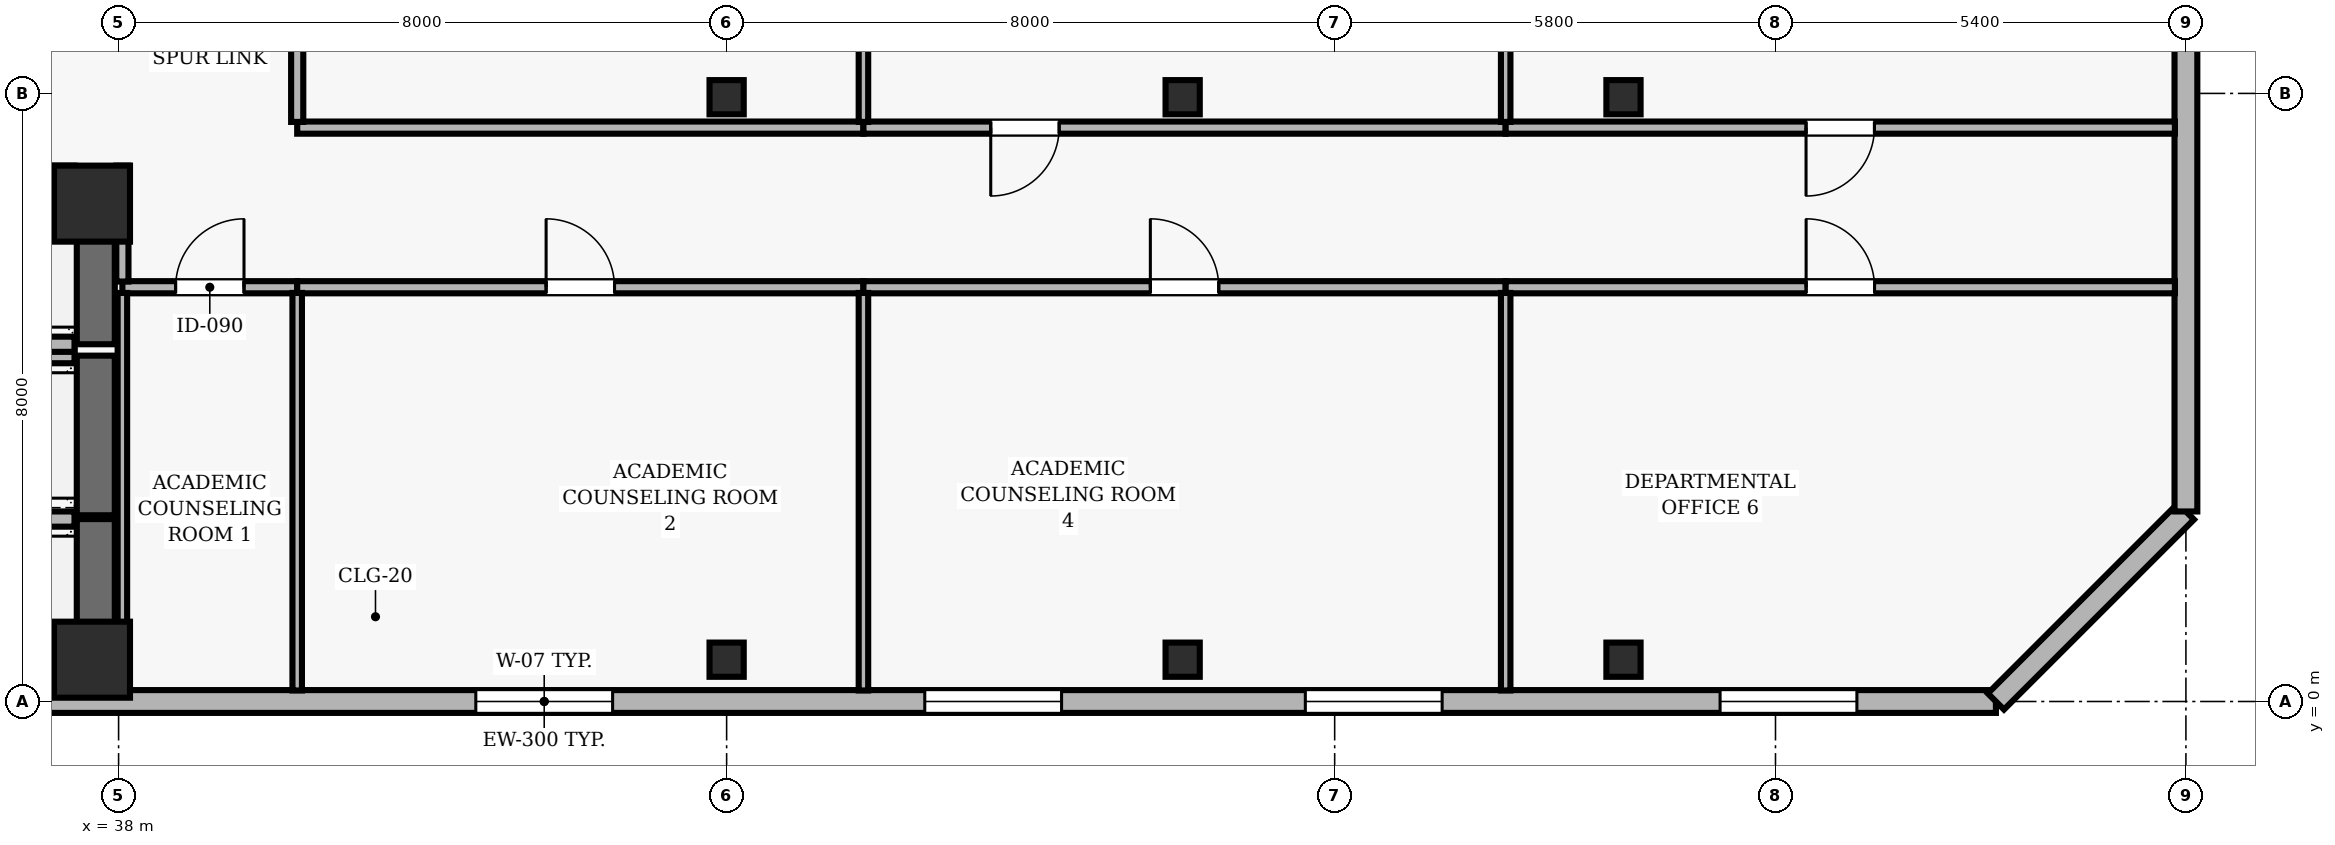
"""IFC4 building model, lengths in metres.
Left out: names, types, materials, properties, quantities, classifications, styles, units other than length and angle.
Written with IfcOpenShell. Run it as: python <this file> out.ifc"""

import sys

from ifc_helpers import new_model, si_unit, direction, frame, frame_2d, origin, origin_2d, place, context, subcontext, project, spatial, rectangle, hollow_rectangle, extrude, element, fill, save


model = new_model("IFC4")
c1 = context("Model", 3, precision=1e-05, world=origin(), true_north=direction((0.0, 1.0)))
c2 = subcontext(c1, "Body", "Model", "MODEL_VIEW")
j1 = project(units=[si_unit("LENGTHUNIT", "METRE"), si_unit("PLANEANGLEUNIT", "RADIAN")], contexts=[c1])
p1 = place(None, origin())
s1 = spatial("IfcSite", under=j1, at=p1, CompositionType="ELEMENT")
p2 = place(p1, origin())
s2 = spatial("IfcBuilding", under=s1, at=p2, CompositionType="ELEMENT")
p3 = place(p2, frame((0.0, 0.0, 222.6)))
s3 = spatial("IfcBuildingStorey", under=s2, at=p3, CompositionType="ELEMENT", Elevation=222.6)
for number, where, z_axis, x_axis in (
    (1, (37.65, 0.55, 0.0), (0.0, 0.0, 1.0), (1.0, 0.0, 0.0)),
    (2, (37.65, 6.55, 0.0), (0.0, 0.0, 1.0), (1.0, 0.0, 0.0)),
):
    element("IfcColumn", number, at=place(p3, frame(where, z_axis=z_axis, x_axis=x_axis)), inside=s3, PredefinedType="COLUMN", context=c2, shape_type="SweptSolid", body=[
        extrude(rectangle(XDim=1.0, YDim=1.0, at=origin_2d()), origin(), (0.0, 0.0, 1.0), 3.9),
    ])
for number, where, z_axis, x_axis in (
    (3, (46.0, 0.55, 0.0), (0.0, 0.0, 1.0), (1.0, 0.0, 0.0)),
    (4, (46.0, 7.95, 0.0), (0.0, 0.0, 1.0), (1.0, 0.0, 0.0)),
    (5, (52.0, 0.55, 0.0), (0.0, 0.0, 1.0), (1.0, 0.0, 0.0)),
    (6, (52.0, 7.95, 0.0), (0.0, 0.0, 1.0), (1.0, 0.0, 0.0)),
    (7, (57.8, 0.55, 0.0), (0.0, 0.0, 1.0), (1.0, 0.0, 0.0)),
    (8, (57.8, 7.95, 0.0), (0.0, 0.0, 1.0), (1.0, 0.0, 0.0)),
):
    element("IfcColumn", number, at=place(p3, frame(where, z_axis=z_axis, x_axis=x_axis)), inside=s3, PredefinedType="COLUMN", context=c2, shape_type="SweptSolid", body=[
        extrude(hollow_rectangle(XDim=0.45, YDim=0.45, WallThickness=0.02, at=origin_2d()), origin(), (0.0, 0.0, 1.0), 3.9),
    ])
p4 = place(p3, frame((24.5, 0.0, 0.0), z_axis=(0.0, 0.0, 1.0), x_axis=(1.0, 0.0, 0.0)))
e9 = element("IfcWall", 9, at=p4, inside=s3, PredefinedType="SOLIDWALL", context=c2, shape_type="SweptSolid", body=[
    extrude(rectangle(XDim=38.2, YDim=0.3, at=frame_2d((19.1, 0.0))), origin(), (0.0, 0.0, 1.0), 3.69),
])
p5 = place(p4, frame((1.829, 0.0, 0.9)))
e10 = element("IfcOpeningElement", 10, at=p5, cuts=e9, PredefinedType="OPENING", context=c2, shape_type="SweptSolid", body=[
    extrude(rectangle(XDim=1.8, YDim=1.8, at=frame_2d((0.9, 0.9))), frame((0.0, 0.16, 0.0), z_axis=(0.0, -1.0, 0.0), x_axis=(1.0, 0.0, 0.0)), (0.0, 0.0, 1.0), 0.32),
])
p6 = place(p4, frame((8.186, 0.0, 0.9)))
e11 = element("IfcOpeningElement", 11, at=p6, cuts=e9, PredefinedType="OPENING", context=c2, shape_type="SweptSolid", body=[
    extrude(rectangle(XDim=1.8, YDim=1.8, at=frame_2d((0.9, 0.9))), frame((0.0, 0.16, 0.0), z_axis=(0.0, -1.0, 0.0), x_axis=(1.0, 0.0, 0.0)), (0.0, 0.0, 1.0), 0.32),
])
p7 = place(p4, frame((18.2, 0.0, 0.9)))
e12 = element("IfcOpeningElement", 12, at=p7, cuts=e9, PredefinedType="OPENING", context=c2, shape_type="SweptSolid", body=[
    extrude(rectangle(XDim=1.8, YDim=1.8, at=frame_2d((0.9, 0.9))), frame((0.0, 0.16, 0.0), z_axis=(0.0, -1.0, 0.0), x_axis=(1.0, 0.0, 0.0)), (0.0, 0.0, 1.0), 0.32),
])
p8 = place(p4, frame((24.107, 0.0, 0.9)))
e13 = element("IfcOpeningElement", 13, at=p8, cuts=e9, PredefinedType="OPENING", context=c2, shape_type="SweptSolid", body=[
    extrude(rectangle(XDim=1.8, YDim=1.8, at=frame_2d((0.9, 0.9))), frame((0.0, 0.16, 0.0), z_axis=(0.0, -1.0, 0.0), x_axis=(1.0, 0.0, 0.0)), (0.0, 0.0, 1.0), 0.32),
])
p9 = place(p4, frame((29.114, 0.0, 0.9)))
e14 = element("IfcOpeningElement", 14, at=p9, cuts=e9, PredefinedType="OPENING", context=c2, shape_type="SweptSolid", body=[
    extrude(rectangle(XDim=1.8, YDim=1.8, at=frame_2d((0.9, 0.9))), frame((0.0, 0.16, 0.0), z_axis=(0.0, -1.0, 0.0), x_axis=(1.0, 0.0, 0.0)), (0.0, 0.0, 1.0), 0.32),
])
p10 = place(p4, frame((34.571, 0.0, 0.9)))
e15 = element("IfcOpeningElement", 15, at=p10, cuts=e9, PredefinedType="OPENING", context=c2, shape_type="SweptSolid", body=[
    extrude(rectangle(XDim=1.8, YDim=1.8, at=frame_2d((0.9, 0.9))), frame((0.0, 0.16, 0.0), z_axis=(0.0, -1.0, 0.0), x_axis=(1.0, 0.0, 0.0)), (0.0, 0.0, 1.0), 0.32),
])
p11 = place(p3, frame((62.7, 0.0, 0.0), z_axis=(0.0, 0.0, 1.0), x_axis=(0.707106781187, 0.707106781187, 0.0)))
e16 = element("IfcWall", 16, at=p11, inside=s3, PredefinedType="SOLIDWALL", context=c2, shape_type="SweptSolid", body=[
    extrude(rectangle(XDim=3.536, YDim=0.3, at=frame_2d((1.768, 0.0))), origin(), (0.0, 0.0, 1.0), 3.69),
])
p12 = place(p3, frame((65.2, 2.5, 0.0), z_axis=(0.0, 0.0, 1.0), x_axis=(0.0, 1.0, 0.0)))
e17 = element("IfcWall", 17, at=p12, inside=s3, PredefinedType="SOLIDWALL", context=c2, shape_type="SweptSolid", body=[
    extrude(rectangle(XDim=11.0, YDim=0.3, at=frame_2d((5.5, 0.0))), origin(), (0.0, 0.0, 1.0), 3.69),
])
p13 = place(p12, frame((6.85, 0.0, 0.9)))
e18 = element("IfcOpeningElement", 18, at=p13, cuts=e17, PredefinedType="OPENING", context=c2, shape_type="SweptSolid", body=[
    extrude(rectangle(XDim=2.8, YDim=1.8, at=frame_2d((1.4, 0.9))), frame((0.0, 0.16, 0.0), z_axis=(0.0, -1.0, 0.0), x_axis=(1.0, 0.0, 0.0)), (0.0, 0.0, 1.0), 0.32),
])
p14 = place(p3, frame((37.7, 0.3, 0.0), z_axis=(0.0, 0.0, 1.0), x_axis=(0.0, 1.0, 0.0)))
e19 = element("IfcWall", 19, at=p14, inside=s3, PredefinedType="SHEAR", context=c2, shape_type="SweptSolid", body=[
    extrude(rectangle(XDim=2.1, YDim=0.5, at=frame_2d((1.05, 0.0))), origin(), (0.0, 0.0, 1.0), 3.69),
])
for number, where, z_axis, x_axis in (
    (20, (35.28, 0.3, 0.0), (0.0, 0.0, 1.0), (1.0, 0.0, 0.0)),
    (21, (37.42, 2.4, 0.0), (0.0, 0.0, 1.0), (-1.0, 0.0, 0.0)),
):
    element("IfcWall", number, at=place(p3, frame(where, z_axis=z_axis, x_axis=x_axis)), inside=s3, PredefinedType="SOLIDWALL", context=c2, shape_type="SweptSolid", body=[
        extrude(rectangle(XDim=2.14, YDim=0.2, at=frame_2d((1.07, 0.0))), origin(), (0.0, 0.0, 1.0), 3.69),
    ])
p15 = place(p3, frame((37.7, 2.45, 0.0), z_axis=(0.0, 0.0, 1.0), x_axis=(0.0, 1.0, 0.0)))
e22 = element("IfcWall", 22, at=p15, inside=s3, PredefinedType="SHEAR", context=c2, shape_type="SweptSolid", body=[
    extrude(rectangle(XDim=2.1, YDim=0.5, at=frame_2d((1.05, 0.0))), origin(), (0.0, 0.0, 1.0), 3.69),
])
p16 = place(p3, frame((37.42, 4.55, 0.0), z_axis=(0.0, 0.0, 1.0), x_axis=(-1.0, 0.0, 0.0)))
e23 = element("IfcWall", 23, at=p16, inside=s3, PredefinedType="SOLIDWALL", context=c2, shape_type="SweptSolid", body=[
    extrude(rectangle(XDim=2.14, YDim=0.2, at=frame_2d((1.07, 0.0))), origin(), (0.0, 0.0, 1.0), 3.69),
])
p17 = place(p3, frame((37.7, 4.7, 0.0), z_axis=(0.0, 0.0, 1.0), x_axis=(0.0, 1.0, 0.0)))
e24 = element("IfcWall", 24, at=p17, inside=s3, PredefinedType="SHEAR", context=c2, shape_type="SweptSolid", body=[
    extrude(rectangle(XDim=2.25, YDim=0.5, at=frame_2d((1.125, 0.0))), origin(), (0.0, 0.0, 1.0), 3.69),
])
for number, where, z_axis, x_axis in (
    (25, (35.28, 4.7, 0.0), (0.0, 0.0, 1.0), (1.0, 0.0, 0.0)),
    (26, (37.42, 6.95, 0.0), (0.0, 0.0, 1.0), (-1.0, 0.0, 0.0)),
):
    element("IfcWall", number, at=place(p3, frame(where, z_axis=z_axis, x_axis=x_axis)), inside=s3, PredefinedType="SOLIDWALL", context=c2, shape_type="SweptSolid", body=[
        extrude(rectangle(XDim=2.14, YDim=0.2, at=frame_2d((1.07, 0.0))), origin(), (0.0, 0.0, 1.0), 3.69),
    ])
p18 = place(p3, frame((38.05, 5.45, 0.0), z_axis=(0.0, 0.0, 1.0), x_axis=(1.0, 0.0, 0.0)))
e27 = element("IfcWall", 27, at=p18, inside=s3, PredefinedType="PARTITIONING", context=c2, shape_type="SweptSolid", body=[
    extrude(rectangle(XDim=2.3, YDim=0.16, at=frame_2d((1.15, 0.0))), origin(), (0.0, 0.0, 1.0), 3.343),
])
p19 = place(p18, frame((0.7, 0.0, 0.0)))
e28 = element("IfcOpeningElement", 28, at=p19, cuts=e27, PredefinedType="OPENING", context=c2, shape_type="SweptSolid", body=[
    extrude(rectangle(XDim=0.9, YDim=2.1, at=frame_2d((0.45, 1.05))), frame((0.0, 0.09, 0.0), z_axis=(0.0, -1.0, 0.0), x_axis=(1.0, 0.0, 0.0)), (0.0, 0.0, 1.0), 0.18),
])
p20 = place(p3, frame((40.35, 5.45, 0.0), z_axis=(0.0, 0.0, 1.0), x_axis=(1.0, 0.0, 0.0)))
e29 = element("IfcWall", 29, at=p20, inside=s3, PredefinedType="PARTITIONING", context=c2, shape_type="SweptSolid", body=[
    extrude(rectangle(XDim=7.45, YDim=0.16, at=frame_2d((3.725, 0.0))), origin(), (0.0, 0.0, 1.0), 3.343),
])
p21 = place(p20, frame((3.275, 0.0, 0.0)))
e30 = element("IfcOpeningElement", 30, at=p21, cuts=e29, PredefinedType="OPENING", context=c2, shape_type="SweptSolid", body=[
    extrude(rectangle(XDim=0.9, YDim=2.1, at=frame_2d((0.45, 1.05))), frame((0.0, 0.09, 0.0), z_axis=(0.0, -1.0, 0.0), x_axis=(1.0, 0.0, 0.0)), (0.0, 0.0, 1.0), 0.18),
])
p22 = place(p3, frame((47.8, 5.45, 0.0), z_axis=(0.0, 0.0, 1.0), x_axis=(1.0, 0.0, 0.0)))
e31 = element("IfcWall", 31, at=p22, inside=s3, PredefinedType="PARTITIONING", context=c2, shape_type="SweptSolid", body=[
    extrude(rectangle(XDim=8.45, YDim=0.16, at=frame_2d((4.225, 0.0))), origin(), (0.0, 0.0, 1.0), 3.343),
])
p23 = place(p22, frame((3.775, 0.0, 0.0)))
e32 = element("IfcOpeningElement", 32, at=p23, cuts=e31, PredefinedType="OPENING", context=c2, shape_type="SweptSolid", body=[
    extrude(rectangle(XDim=0.9, YDim=2.1, at=frame_2d((0.45, 1.05))), frame((0.0, 0.09, 0.0), z_axis=(0.0, -1.0, 0.0), x_axis=(1.0, 0.0, 0.0)), (0.0, 0.0, 1.0), 0.18),
])
p24 = place(p3, frame((47.8, 7.55, 0.0), z_axis=(0.0, 0.0, 1.0), x_axis=(-1.0, 0.0, 0.0)))
e33 = element("IfcWall", 33, at=p24, inside=s3, PredefinedType="PARTITIONING", context=c2, shape_type="SweptSolid", body=[
    extrude(rectangle(XDim=7.45, YDim=0.16, at=frame_2d((3.725, 0.0))), origin(), (0.0, 0.0, 1.0), 3.139),
])
p25 = place(p3, frame((56.25, 5.45, 0.0), z_axis=(0.0, 0.0, 1.0), x_axis=(1.0, 0.0, 0.0)))
e34 = element("IfcWall", 34, at=p25, inside=s3, PredefinedType="PARTITIONING", context=c2, shape_type="SweptSolid", body=[
    extrude(rectangle(XDim=8.805, YDim=0.16, at=frame_2d((4.402, 0.0))), origin(), (0.0, 0.0, 1.0), 3.343),
])
p26 = place(p25, frame((3.953, 0.0, 0.0)))
e35 = element("IfcOpeningElement", 35, at=p26, cuts=e34, PredefinedType="OPENING", context=c2, shape_type="SweptSolid", body=[
    extrude(rectangle(XDim=0.9, YDim=2.1, at=frame_2d((0.45, 1.05))), frame((0.0, 0.09, 0.0), z_axis=(0.0, -1.0, 0.0), x_axis=(1.0, 0.0, 0.0)), (0.0, 0.0, 1.0), 0.18),
])
p27 = place(p3, frame((56.25, 7.55, 0.0), z_axis=(0.0, 0.0, 1.0), x_axis=(-1.0, 0.0, 0.0)))
e36 = element("IfcWall", 36, at=p27, inside=s3, PredefinedType="PARTITIONING", context=c2, shape_type="SweptSolid", body=[
    extrude(rectangle(XDim=8.45, YDim=0.16, at=frame_2d((4.225, 0.0))), origin(), (0.0, 0.0, 1.0), 3.139),
])
p28 = place(p27, frame((5.875, 0.0, 0.0)))
e37 = element("IfcOpeningElement", 37, at=p28, cuts=e36, PredefinedType="OPENING", context=c2, shape_type="SweptSolid", body=[
    extrude(rectangle(XDim=0.9, YDim=2.1, at=frame_2d((0.45, 1.05))), frame((0.0, 0.09, 0.0), z_axis=(0.0, -1.0, 0.0), x_axis=(1.0, 0.0, 0.0)), (0.0, 0.0, 1.0), 0.18),
])
p29 = place(p3, frame((65.055, 7.55, 0.0), z_axis=(0.0, 0.0, 1.0), x_axis=(-1.0, 0.0, 0.0)))
e38 = element("IfcWall", 38, at=p29, inside=s3, PredefinedType="PARTITIONING", context=c2, shape_type="SweptSolid", body=[
    extrude(rectangle(XDim=8.805, YDim=0.16, at=frame_2d((4.402, 0.0))), origin(), (0.0, 0.0, 1.0), 3.139),
])
p30 = place(p29, frame((3.953, 0.0, 0.0)))
e39 = element("IfcOpeningElement", 39, at=p30, cuts=e38, PredefinedType="OPENING", context=c2, shape_type="SweptSolid", body=[
    extrude(rectangle(XDim=0.9, YDim=2.1, at=frame_2d((0.45, 1.05))), frame((0.0, 0.09, 0.0), z_axis=(0.0, -1.0, 0.0), x_axis=(1.0, 0.0, 0.0)), (0.0, 0.0, 1.0), 0.18),
])
p31 = place(p3, frame((38.05, 5.375, 0.0), z_axis=(0.0, 0.0, 1.0), x_axis=(0.0, -1.0, 0.0)))
e40 = element("IfcWall", 40, at=p31, inside=s3, PredefinedType="PARTITIONING", context=c2, shape_type="SweptSolid", body=[
    extrude(rectangle(XDim=5.23, YDim=0.125, at=frame_2d((2.615, 0.0))), origin(), (0.0, 0.0, 1.0), 3.139),
])
p32 = place(p3, frame((38.05, 7.05, 0.0), z_axis=(0.0, 0.0, 1.0), x_axis=(0.0, -1.0, 0.0)))
e41 = element("IfcWall", 41, at=p32, inside=s3, PredefinedType="PARTITIONING", context=c2, shape_type="SweptSolid", body=[
    extrude(rectangle(XDim=1.525, YDim=0.16, at=frame_2d((0.763, 0.0))), origin(), (0.0, 0.0, 1.0), 3.139),
])
p33 = place(p3, frame((40.35, 0.145, 0.0), z_axis=(0.0, 0.0, 1.0), x_axis=(0.0, 1.0, 0.0)))
e42 = element("IfcWall", 42, at=p33, inside=s3, PredefinedType="PARTITIONING", context=c2, shape_type="SweptSolid", body=[
    extrude(rectangle(XDim=5.23, YDim=0.125, at=frame_2d((2.615, 0.0))), origin(), (0.0, 0.0, 1.0), 3.69),
])
p34 = place(p3, frame((40.35, 7.625, 0.0), z_axis=(0.0, 0.0, 1.0), x_axis=(0.0, 1.0, 0.0)))
e43 = element("IfcWall", 43, at=p34, inside=s3, PredefinedType="PARTITIONING", context=c2, shape_type="SweptSolid", body=[
    extrude(rectangle(XDim=8.3, YDim=0.16, at=frame_2d((4.15, 0.0))), origin(), (0.0, 0.0, 1.0), 3.69),
])
p35 = place(p34, frame((3.7, 0.0, 0.0)))
e44 = element("IfcOpeningElement", 44, at=p35, cuts=e43, PredefinedType="OPENING", context=c2, shape_type="SweptSolid", body=[
    extrude(rectangle(XDim=0.9, YDim=2.1, at=frame_2d((0.45, 1.05))), frame((0.0, 0.09, 0.0), z_axis=(0.0, -1.0, 0.0), x_axis=(1.0, 0.0, 0.0)), (0.0, 0.0, 1.0), 0.18),
])
p36 = place(p3, frame((47.8, 0.145, 0.0), z_axis=(0.0, 0.0, 1.0), x_axis=(0.0, 1.0, 0.0)))
e45 = element("IfcWall", 45, at=p36, inside=s3, PredefinedType="PARTITIONING", context=c2, shape_type="SweptSolid", body=[
    extrude(rectangle(XDim=5.23, YDim=0.125, at=frame_2d((2.615, 0.0))), origin(), (0.0, 0.0, 1.0), 3.69),
])
p37 = place(p3, frame((47.8, 7.625, 0.0), z_axis=(0.0, 0.0, 1.0), x_axis=(0.0, 1.0, 0.0)))
e46 = element("IfcWall", 46, at=p37, inside=s3, PredefinedType="PARTITIONING", context=c2, shape_type="SweptSolid", body=[
    extrude(rectangle(XDim=8.23, YDim=0.125, at=frame_2d((4.115, 0.0))), origin(), (0.0, 0.0, 1.0), 3.69),
])
p38 = place(p3, frame((56.25, 0.145, 0.0), z_axis=(0.0, 0.0, 1.0), x_axis=(0.0, 1.0, 0.0)))
e47 = element("IfcWall", 47, at=p38, inside=s3, PredefinedType="PARTITIONING", context=c2, shape_type="SweptSolid", body=[
    extrude(rectangle(XDim=5.23, YDim=0.125, at=frame_2d((2.615, 0.0))), origin(), (0.0, 0.0, 1.0), 3.69),
])
p39 = place(p3, frame((56.25, 7.625, 0.0), z_axis=(0.0, 0.0, 1.0), x_axis=(0.0, 1.0, 0.0)))
e48 = element("IfcWall", 48, at=p39, inside=s3, PredefinedType="PARTITIONING", context=c2, shape_type="SweptSolid", body=[
    extrude(rectangle(XDim=8.23, YDim=0.125, at=frame_2d((4.115, 0.0))), origin(), (0.0, 0.0, 1.0), 3.69),
])
p40 = place(p7, origin())
e49 = element("IfcWindow", 49, at=p40, inside=s3, PartitioningType="SINGLE_PANEL", PredefinedType="WINDOW", context=c2, shape_type="SweptSolid", body=[
    extrude(rectangle(XDim=1.8, YDim=1.8, at=frame_2d((0.9, 0.9))), frame((0.0, 0.03, 0.0), z_axis=(0.0, -1.0, 0.0), x_axis=(1.0, 0.0, 0.0)), (0.0, 0.0, 1.0), 0.06),
])
fill(e12, e49)
p41 = place(p8, origin())
e50 = element("IfcWindow", 50, at=p41, inside=s3, PartitioningType="SINGLE_PANEL", PredefinedType="WINDOW", context=c2, shape_type="SweptSolid", body=[
    extrude(rectangle(XDim=1.8, YDim=1.8, at=frame_2d((0.9, 0.9))), frame((0.0, 0.03, 0.0), z_axis=(0.0, -1.0, 0.0), x_axis=(1.0, 0.0, 0.0)), (0.0, 0.0, 1.0), 0.06),
])
fill(e13, e50)
p42 = place(p9, origin())
e51 = element("IfcWindow", 51, at=p42, inside=s3, PartitioningType="SINGLE_PANEL", PredefinedType="WINDOW", context=c2, shape_type="SweptSolid", body=[
    extrude(rectangle(XDim=1.8, YDim=1.8, at=frame_2d((0.9, 0.9))), frame((0.0, 0.03, 0.0), z_axis=(0.0, -1.0, 0.0), x_axis=(1.0, 0.0, 0.0)), (0.0, 0.0, 1.0), 0.06),
])
fill(e14, e51)
p43 = place(p10, origin())
e52 = element("IfcWindow", 52, at=p43, inside=s3, PartitioningType="SINGLE_PANEL", PredefinedType="WINDOW", context=c2, shape_type="SweptSolid", body=[
    extrude(rectangle(XDim=1.8, YDim=1.8, at=frame_2d((0.9, 0.9))), frame((0.0, 0.03, 0.0), z_axis=(0.0, -1.0, 0.0), x_axis=(1.0, 0.0, 0.0)), (0.0, 0.0, 1.0), 0.06),
])
fill(e15, e52)
p44 = place(p19, origin())
e53 = element("IfcDoor", 53, at=p44, inside=s3, OperationType="SINGLE_SWING_RIGHT", PredefinedType="DOOR", context=c2, shape_type="SweptSolid", body=[
    extrude(rectangle(XDim=0.9, YDim=2.1, at=frame_2d((0.45, 1.05))), frame((0.0, 0.025, 0.0), z_axis=(0.0, -1.0, 0.0), x_axis=(1.0, 0.0, 0.0)), (0.0, 0.0, 1.0), 0.05),
])
fill(e28, e53)
p45 = place(p21, origin())
e54 = element("IfcDoor", 54, at=p45, inside=s3, OperationType="SINGLE_SWING_LEFT", PredefinedType="DOOR", context=c2, shape_type="SweptSolid", body=[
    extrude(rectangle(XDim=0.9, YDim=2.1, at=frame_2d((0.45, 1.05))), frame((0.0, 0.025, 0.0), z_axis=(0.0, -1.0, 0.0), x_axis=(1.0, 0.0, 0.0)), (0.0, 0.0, 1.0), 0.05),
])
fill(e30, e54)
p46 = place(p23, origin())
e55 = element("IfcDoor", 55, at=p46, inside=s3, OperationType="SINGLE_SWING_LEFT", PredefinedType="DOOR", context=c2, shape_type="SweptSolid", body=[
    extrude(rectangle(XDim=0.9, YDim=2.1, at=frame_2d((0.45, 1.05))), frame((0.0, 0.025, 0.0), z_axis=(0.0, -1.0, 0.0), x_axis=(1.0, 0.0, 0.0)), (0.0, 0.0, 1.0), 0.05),
])
fill(e32, e55)
p47 = place(p28, origin())
e56 = element("IfcDoor", 56, at=p47, inside=s3, OperationType="SINGLE_SWING_RIGHT", PredefinedType="DOOR", context=c2, shape_type="SweptSolid", body=[
    extrude(rectangle(XDim=0.9, YDim=2.1, at=frame_2d((0.45, 1.05))), frame((0.0, 0.025, 0.0), z_axis=(0.0, -1.0, 0.0), x_axis=(1.0, 0.0, 0.0)), (0.0, 0.0, 1.0), 0.05),
])
fill(e37, e56)
p48 = place(p26, origin())
e57 = element("IfcDoor", 57, at=p48, inside=s3, OperationType="SINGLE_SWING_LEFT", PredefinedType="DOOR", context=c2, shape_type="SweptSolid", body=[
    extrude(rectangle(XDim=0.9, YDim=2.1, at=frame_2d((0.45, 1.05))), frame((0.0, 0.025, 0.0), z_axis=(0.0, -1.0, 0.0), x_axis=(1.0, 0.0, 0.0)), (0.0, 0.0, 1.0), 0.05),
])
fill(e35, e57)
p49 = place(p30, origin())
e58 = element("IfcDoor", 58, at=p49, inside=s3, OperationType="SINGLE_SWING_RIGHT", PredefinedType="DOOR", context=c2, shape_type="SweptSolid", body=[
    extrude(rectangle(XDim=0.9, YDim=2.1, at=frame_2d((0.45, 1.05))), frame((0.0, 0.025, 0.0), z_axis=(0.0, -1.0, 0.0), x_axis=(1.0, 0.0, 0.0)), (0.0, 0.0, 1.0), 0.05),
])
fill(e39, e58)
save(model, sys.argv[1])
